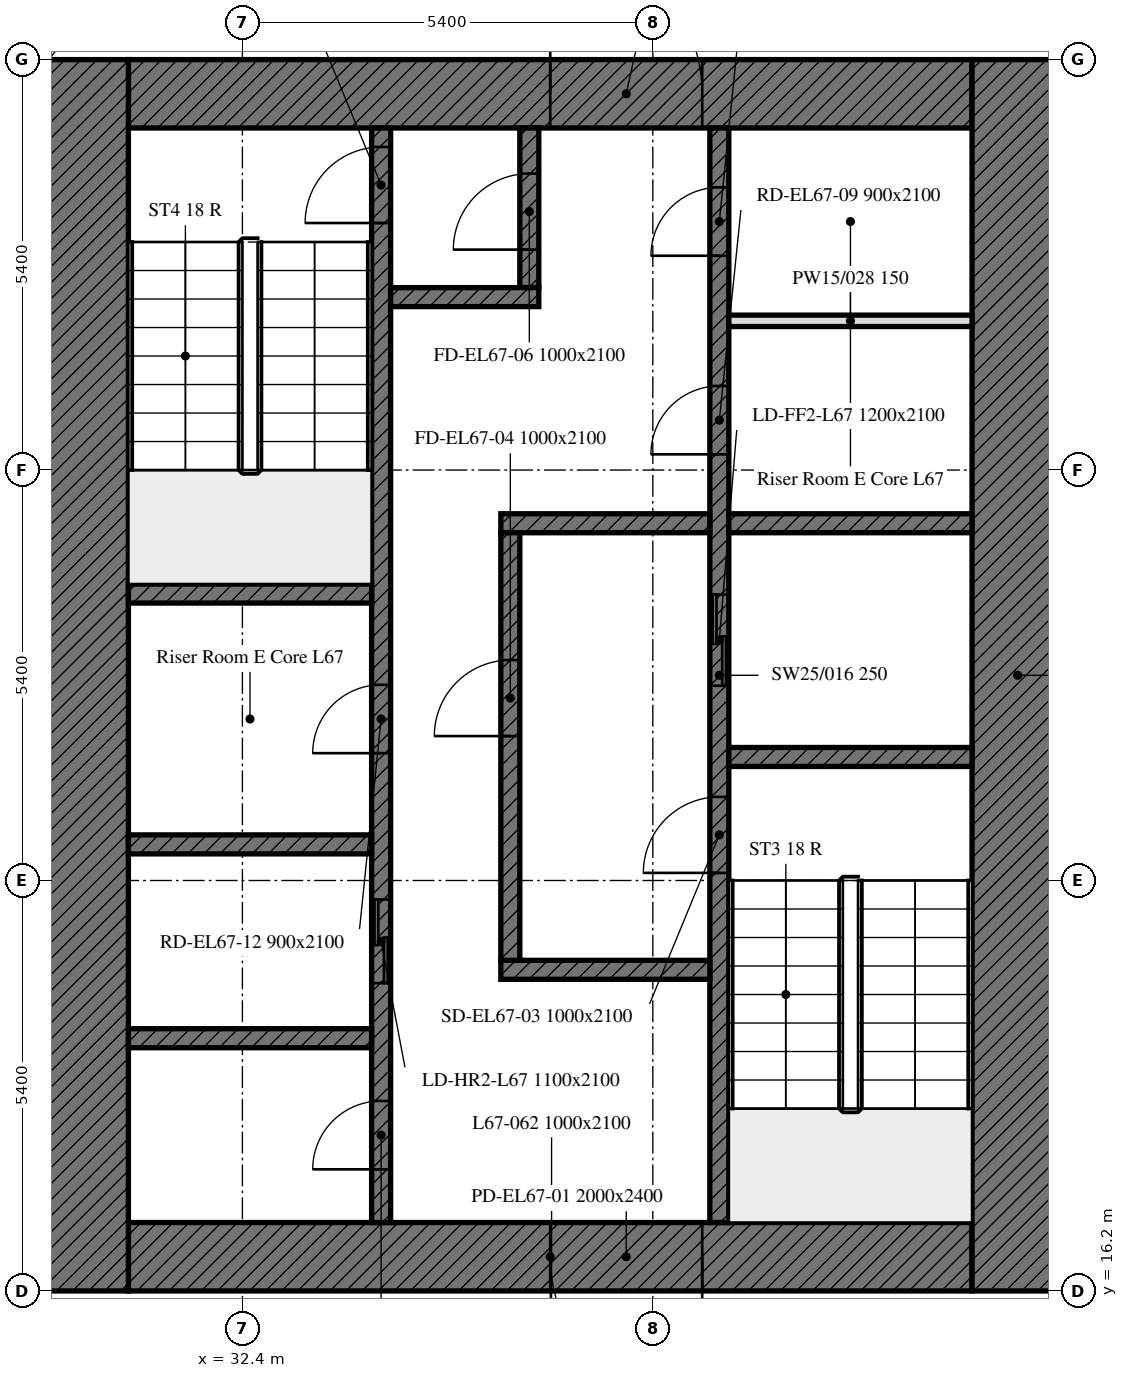
"""IFC4 building model, lengths in metres.
Left out: names, types, materials, properties, quantities, classifications, styles, units other than length and angle.
Written with IfcOpenShell. Run it as: python <this file> out.ifc"""

import sys

from ifc_helpers import new_model, si_unit, direction, frame, frame_2d, origin, place, context, subcontext, project, spatial, rectangle, extrude, element, fill, save


model = new_model("IFC4")
c1 = context("Model", 3, precision=1e-05, world=origin(), true_north=direction((0.0, 1.0)))
c2 = subcontext(c1, "Body", "Model", "MODEL_VIEW")
j1 = project(units=[si_unit("LENGTHUNIT", "METRE"), si_unit("PLANEANGLEUNIT", "RADIAN")], contexts=[c1])
p1 = place(None, origin())
s1 = spatial("IfcSite", under=j1, at=p1, CompositionType="ELEMENT")
p2 = place(p1, origin())
s2 = spatial("IfcBuilding", under=s1, at=p2, CompositionType="ELEMENT")
p3 = place(p2, frame((0.0, 0.0, 275.2)))
s3 = spatial("IfcBuildingStorey", under=s2, at=p3, CompositionType="ELEMENT", Elevation=275.2)
p4 = place(p3, frame((42.0, 16.65, 0.0), z_axis=(0.0, 0.0, 1.0), x_axis=(-1.0, 0.0, 0.0)))
e1 = element("IfcWall", 1, at=p4, inside=s3, PredefinedType="SOLIDWALL", context=c2, shape_type="SweptSolid", body=[
    extrude(rectangle(XDim=11.1, YDim=0.9, at=frame_2d((5.55, 0.0))), origin(), (0.0, 0.0, 1.0), 3.0),
])
p5 = place(p4, frame((3.55, 0.0, 0.0)))
e2 = element("IfcOpeningElement", 2, at=p5, cuts=e1, PredefinedType="OPENING", context=c2, shape_type="SweptSolid", body=[
    extrude(rectangle(XDim=2.0, YDim=2.4, at=frame_2d((1.0, 1.2))), frame((0.0, 0.45, 0.0), z_axis=(0.0, -1.0, 0.0), x_axis=(1.0, 0.0, 0.0)), (0.0, 0.0, 1.0), 0.9),
])
p6 = place(p3, frame((30.9, 31.95, 0.0), z_axis=(0.0, 0.0, 1.0), x_axis=(1.0, 0.0, 0.0)))
e3 = element("IfcWall", 3, at=p6, inside=s3, PredefinedType="SOLIDWALL", context=c2, shape_type="SweptSolid", body=[
    extrude(rectangle(XDim=11.1, YDim=0.9, at=frame_2d((5.55, 0.0))), origin(), (0.0, 0.0, 1.0), 3.0),
])
p7 = place(p6, frame((5.55, 0.0, 0.0)))
e4 = element("IfcOpeningElement", 4, at=p7, cuts=e3, PredefinedType="OPENING", context=c2, shape_type="SweptSolid", body=[
    extrude(rectangle(XDim=2.0, YDim=2.4, at=frame_2d((1.0, 1.2))), frame((0.0, 0.45, 0.0), z_axis=(0.0, -1.0, 0.0), x_axis=(1.0, 0.0, 0.0)), (0.0, 0.0, 1.0), 0.9),
])
for number, where, z_axis, x_axis in (
    (5, (42.6, 32.4, 0.0), (0.0, 0.0, 1.0), (0.0, -1.0, 0.0)),
    (6, (30.3, 16.2, 0.0), (0.0, 0.0, 1.0), (0.0, 1.0, 0.0)),
):
    element("IfcWall", number, at=place(p3, frame(where, z_axis=z_axis, x_axis=x_axis)), inside=s3, PredefinedType="SOLIDWALL", context=c2, shape_type="SweptSolid", body=[
        extrude(rectangle(XDim=16.2, YDim=1.2, at=frame_2d((8.1, 0.0))), origin(), (0.0, 0.0, 1.0), 3.0),
    ])
p8 = place(p3, frame((38.675, 17.1, 0.0), z_axis=(0.0, 0.0, 1.0), x_axis=(0.0, 1.0, 0.0)))
e7 = element("IfcWall", 7, at=p8, inside=s3, PredefinedType="SOLIDWALL", context=c2, shape_type="SweptSolid", body=[
    extrude(rectangle(XDim=14.4, YDim=0.25, at=frame_2d((7.2, 0.0))), origin(), (0.0, 0.0, 1.0), 3.0),
])
p9 = place(p8, frame((4.6, 0.0, 0.0)))
e8 = element("IfcOpeningElement", 8, at=p9, cuts=e7, PredefinedType="OPENING", context=c2, shape_type="SweptSolid", body=[
    extrude(rectangle(XDim=1.0, YDim=2.1, at=frame_2d((0.5, 1.05))), frame((0.0, 0.125, 0.0), z_axis=(0.0, -1.0, 0.0), x_axis=(1.0, 0.0, 0.0)), (0.0, 0.0, 1.0), 0.25),
])
p10 = place(p8, frame((7.062, 0.0, 0.0)))
e9 = element("IfcOpeningElement", 9, at=p10, cuts=e7, PredefinedType="OPENING", context=c2, shape_type="SweptSolid", body=[
    extrude(rectangle(XDim=1.2, YDim=2.1, at=frame_2d((0.6, 1.05))), frame((0.0, 0.125, 0.0), z_axis=(0.0, -1.0, 0.0), x_axis=(1.0, 0.0, 0.0)), (0.0, 0.0, 1.0), 0.25),
])
p11 = place(p8, frame((10.106, 0.0, 0.0)))
e10 = element("IfcOpeningElement", 10, at=p11, cuts=e7, PredefinedType="OPENING", context=c2, shape_type="SweptSolid", body=[
    extrude(rectangle(XDim=0.9, YDim=2.1, at=frame_2d((0.45, 1.05))), frame((0.0, 0.125, 0.0), z_axis=(0.0, -1.0, 0.0), x_axis=(1.0, 0.0, 0.0)), (0.0, 0.0, 1.0), 0.25),
])
p12 = place(p8, frame((12.719, 0.0, 0.0)))
e11 = element("IfcOpeningElement", 11, at=p12, cuts=e7, PredefinedType="OPENING", context=c2, shape_type="SweptSolid", body=[
    extrude(rectangle(XDim=0.9, YDim=2.1, at=frame_2d((0.45, 1.05))), frame((0.0, 0.125, 0.0), z_axis=(0.0, -1.0, 0.0), x_axis=(1.0, 0.0, 0.0)), (0.0, 0.0, 1.0), 0.25),
])
p13 = place(p3, frame((34.225, 17.1, 0.0), z_axis=(0.0, 0.0, 1.0), x_axis=(0.0, 1.0, 0.0)))
e12 = element("IfcWall", 12, at=p13, inside=s3, PredefinedType="SOLIDWALL", context=c2, shape_type="SweptSolid", body=[
    extrude(rectangle(XDim=14.4, YDim=0.25, at=frame_2d((7.2, 0.0))), origin(), (0.0, 0.0, 1.0), 3.0),
])
p14 = place(p13, frame((13.15, 0.0, 0.0)))
e13 = element("IfcOpeningElement", 13, at=p14, cuts=e12, PredefinedType="OPENING", context=c2, shape_type="SweptSolid", body=[
    extrude(rectangle(XDim=1.0, YDim=2.1, at=frame_2d((0.5, 1.05))), frame((0.0, 0.125, 0.0), z_axis=(0.0, -1.0, 0.0), x_axis=(1.0, 0.0, 0.0)), (0.0, 0.0, 1.0), 0.25),
])
p15 = place(p13, frame((3.15, 0.0, 0.0)))
e14 = element("IfcOpeningElement", 14, at=p15, cuts=e12, PredefinedType="OPENING", context=c2, shape_type="SweptSolid", body=[
    extrude(rectangle(XDim=1.1, YDim=2.1, at=frame_2d((0.55, 1.05))), frame((0.0, 0.125, 0.0), z_axis=(0.0, -1.0, 0.0), x_axis=(1.0, 0.0, 0.0)), (0.0, 0.0, 1.0), 0.25),
])
p16 = place(p13, frame((0.7, 0.0, 0.0)))
e15 = element("IfcOpeningElement", 15, at=p16, cuts=e12, PredefinedType="OPENING", context=c2, shape_type="SweptSolid", body=[
    extrude(rectangle(XDim=0.9, YDim=2.1, at=frame_2d((0.45, 1.05))), frame((0.0, 0.125, 0.0), z_axis=(0.0, -1.0, 0.0), x_axis=(1.0, 0.0, 0.0)), (0.0, 0.0, 1.0), 0.25),
])
p17 = place(p13, frame((6.175, 0.0, 0.0)))
e16 = element("IfcOpeningElement", 16, at=p17, cuts=e12, PredefinedType="OPENING", context=c2, shape_type="SweptSolid", body=[
    extrude(rectangle(XDim=0.9, YDim=2.1, at=frame_2d((0.45, 1.05))), frame((0.0, 0.125, 0.0), z_axis=(0.0, -1.0, 0.0), x_axis=(1.0, 0.0, 0.0)), (0.0, 0.0, 1.0), 0.25),
])
p18 = place(p3, frame((38.8, 23.225, 0.0), z_axis=(0.0, 0.0, 1.0), x_axis=(1.0, 0.0, 0.0)))
e17 = element("IfcWall", 17, at=p18, inside=s3, PredefinedType="SOLIDWALL", context=c2, shape_type="SweptSolid", body=[
    extrude(rectangle(XDim=3.2, YDim=0.25, at=frame_2d((1.6, 0.0))), origin(), (0.0, 0.0, 1.0), 3.0),
])
for number, where, z_axis, x_axis in (
    (18, (30.9, 25.375, 0.0), (0.0, 0.0, 1.0), (1.0, 0.0, 0.0)),
    (19, (30.9, 22.075, 0.0), (0.0, 0.0, 1.0), (1.0, 0.0, 0.0)),
):
    element("IfcWall", number, at=place(p3, frame(where, z_axis=z_axis, x_axis=x_axis)), inside=s3, PredefinedType="SOLIDWALL", context=c2, shape_type="SweptSolid", body=[
        extrude(rectangle(XDim=3.2, YDim=0.25, at=frame_2d((1.6, 0.0))), origin(), (0.0, 0.0, 1.0), 3.0),
    ])
p19 = place(p3, frame((38.8, 26.3, 0.0), z_axis=(0.0, 0.0, 1.0), x_axis=(1.0, 0.0, 0.0)))
e20 = element("IfcWall", 20, at=p19, inside=s3, PredefinedType="SOLIDWALL", context=c2, shape_type="SweptSolid", body=[
    extrude(rectangle(XDim=3.2, YDim=0.25, at=frame_2d((1.6, 0.0))), origin(), (0.0, 0.0, 1.0), 3.0),
])
for number, where, z_axis, x_axis in (
    (21, (35.8, 26.3, 0.0), (0.0, 0.0, 1.0), (1.0, 0.0, 0.0)),
    (22, (35.8, 20.425, 0.0), (0.0, 0.0, 1.0), (1.0, 0.0, 0.0)),
):
    element("IfcWall", number, at=place(p3, frame(where, z_axis=z_axis, x_axis=x_axis)), inside=s3, PredefinedType="SOLIDWALL", context=c2, shape_type="SweptSolid", body=[
        extrude(rectangle(XDim=2.75, YDim=0.25, at=frame_2d((1.375, 0.0))), origin(), (0.0, 0.0, 1.0), 3.0),
    ])
p20 = place(p3, frame((36.175, 29.4, 0.0), z_axis=(0.0, 0.0, 1.0), x_axis=(0.0, 1.0, 0.0)))
e23 = element("IfcWall", 23, at=p20, inside=s3, PredefinedType="SOLIDWALL", context=c2, shape_type="SweptSolid", body=[
    extrude(rectangle(XDim=2.1, YDim=0.25, at=frame_2d((1.05, 0.0))), origin(), (0.0, 0.0, 1.0), 3.0),
])
p21 = place(p20, frame((0.5, 0.0, 0.0)))
e24 = element("IfcOpeningElement", 24, at=p21, cuts=e23, PredefinedType="OPENING", context=c2, shape_type="SweptSolid", body=[
    extrude(rectangle(XDim=1.0, YDim=2.1, at=frame_2d((0.5, 1.05))), frame((0.0, 0.125, 0.0), z_axis=(0.0, -1.0, 0.0), x_axis=(1.0, 0.0, 0.0)), (0.0, 0.0, 1.0), 0.25),
])
p22 = place(p3, frame((34.35, 29.275, 0.0), z_axis=(0.0, 0.0, 1.0), x_axis=(1.0, 0.0, 0.0)))
e25 = element("IfcWall", 25, at=p22, inside=s3, PredefinedType="SOLIDWALL", context=c2, shape_type="SweptSolid", body=[
    extrude(rectangle(XDim=1.95, YDim=0.25, at=frame_2d((0.975, 0.0))), origin(), (0.0, 0.0, 1.0), 3.0),
])
p23 = place(p3, frame((35.925, 20.55, 0.0), z_axis=(0.0, 0.0, 1.0), x_axis=(0.0, 1.0, 0.0)))
e26 = element("IfcWall", 26, at=p23, inside=s3, PredefinedType="SOLIDWALL", context=c2, shape_type="SweptSolid", body=[
    extrude(rectangle(XDim=5.625, YDim=0.25, at=frame_2d((2.812, 0.0))), origin(), (0.0, 0.0, 1.0), 3.0),
])
p24 = place(p23, frame((2.95, 0.0, 0.0)))
e27 = element("IfcOpeningElement", 27, at=p24, cuts=e26, PredefinedType="OPENING", context=c2, shape_type="SweptSolid", body=[
    extrude(rectangle(XDim=1.0, YDim=2.1, at=frame_2d((0.5, 1.05))), frame((0.0, 0.125, 0.0), z_axis=(0.0, -1.0, 0.0), x_axis=(1.0, 0.0, 0.0)), (0.0, 0.0, 1.0), 0.25),
])
p25 = place(p3, frame((30.9, 19.525, 0.0), z_axis=(0.0, 0.0, 1.0), x_axis=(1.0, 0.0, 0.0)))
e28 = element("IfcWall", 28, at=p25, inside=s3, PredefinedType="SOLIDWALL", context=c2, shape_type="SweptSolid", body=[
    extrude(rectangle(XDim=3.2, YDim=0.25, at=frame_2d((1.6, 0.0))), origin(), (0.0, 0.0, 1.0), 3.0),
])
p26 = place(p3, frame((38.8, 28.963, 0.0), z_axis=(0.0, 0.0, 1.0), x_axis=(1.0, 0.0, 0.0)))
e29 = element("IfcWall", 29, at=p26, inside=s3, PredefinedType="PARTITIONING", context=c2, shape_type="SweptSolid", body=[
    extrude(rectangle(XDim=3.2, YDim=0.15, at=frame_2d((1.6, 0.0))), origin(), (0.0, 0.0, 1.0), 3.0),
])
p27 = place(p5, origin())
e30 = element("IfcDoor", 30, at=p27, inside=s3, OperationType="DOUBLE_DOOR_SINGLE_SWING", PredefinedType="DOOR", context=c2, shape_type="SweptSolid", body=[
    extrude(rectangle(XDim=2.0, YDim=2.4, at=frame_2d((1.0, 1.2))), frame((0.0, 0.025, 0.0), z_axis=(0.0, -1.0, 0.0), x_axis=(1.0, 0.0, 0.0)), (0.0, 0.0, 1.0), 0.05),
])
fill(e2, e30)
p28 = place(p7, origin())
e31 = element("IfcDoor", 31, at=p28, inside=s3, OperationType="DOUBLE_DOOR_SINGLE_SWING", PredefinedType="DOOR", context=c2, shape_type="SweptSolid", body=[
    extrude(rectangle(XDim=2.0, YDim=2.4, at=frame_2d((1.0, 1.2))), frame((0.0, 0.025, 0.0), z_axis=(0.0, -1.0, 0.0), x_axis=(1.0, 0.0, 0.0)), (0.0, 0.0, 1.0), 0.05),
])
fill(e4, e31)
p29 = place(p9, origin())
e32 = element("IfcDoor", 32, at=p29, inside=s3, OperationType="SINGLE_SWING_LEFT", PredefinedType="DOOR", context=c2, shape_type="SweptSolid", body=[
    extrude(rectangle(XDim=1.0, YDim=2.1, at=frame_2d((0.5, 1.05))), frame((0.0, 0.025, 0.0), z_axis=(0.0, -1.0, 0.0), x_axis=(1.0, 0.0, 0.0)), (0.0, 0.0, 1.0), 0.05),
])
fill(e8, e32)
p30 = place(p24, origin())
e33 = element("IfcDoor", 33, at=p30, inside=s3, OperationType="SINGLE_SWING_LEFT", PredefinedType="DOOR", context=c2, shape_type="SweptSolid", body=[
    extrude(rectangle(XDim=1.0, YDim=2.1, at=frame_2d((0.5, 1.05))), frame((0.0, 0.025, 0.0), z_axis=(0.0, -1.0, 0.0), x_axis=(1.0, 0.0, 0.0)), (0.0, 0.0, 1.0), 0.05),
])
fill(e27, e33)
p31 = place(p14, origin())
e34 = element("IfcDoor", 34, at=p31, inside=s3, OperationType="SINGLE_SWING_LEFT", PredefinedType="DOOR", context=c2, shape_type="SweptSolid", body=[
    extrude(rectangle(XDim=1.0, YDim=2.1, at=frame_2d((0.5, 1.05))), frame((0.0, 0.025, 0.0), z_axis=(0.0, -1.0, 0.0), x_axis=(1.0, 0.0, 0.0)), (0.0, 0.0, 1.0), 0.05),
])
fill(e13, e34)
p32 = place(p21, origin())
e35 = element("IfcDoor", 35, at=p32, inside=s3, OperationType="SINGLE_SWING_LEFT", PredefinedType="DOOR", context=c2, shape_type="SweptSolid", body=[
    extrude(rectangle(XDim=1.0, YDim=2.1, at=frame_2d((0.5, 1.05))), frame((0.0, 0.025, 0.0), z_axis=(0.0, -1.0, 0.0), x_axis=(1.0, 0.0, 0.0)), (0.0, 0.0, 1.0), 0.05),
])
fill(e24, e35)
p33 = place(p10, origin())
e36 = element("IfcDoor", 36, at=p33, inside=s3, OperationType="DOUBLE_DOOR_SLIDING", PredefinedType="DOOR", context=c2, shape_type="SweptSolid", body=[
    extrude(rectangle(XDim=1.2, YDim=2.1, at=frame_2d((0.6, 1.05))), frame((0.0, 0.025, 0.0), z_axis=(0.0, -1.0, 0.0), x_axis=(1.0, 0.0, 0.0)), (0.0, 0.0, 1.0), 0.05),
])
fill(e9, e36)
p34 = place(p15, origin())
e37 = element("IfcDoor", 37, at=p34, inside=s3, OperationType="DOUBLE_DOOR_SLIDING", PredefinedType="DOOR", context=c2, shape_type="SweptSolid", body=[
    extrude(rectangle(XDim=1.1, YDim=2.1, at=frame_2d((0.55, 1.05))), frame((0.0, 0.025, 0.0), z_axis=(0.0, -1.0, 0.0), x_axis=(1.0, 0.0, 0.0)), (0.0, 0.0, 1.0), 0.05),
])
fill(e14, e37)
p35 = place(p11, origin())
e38 = element("IfcDoor", 38, at=p35, inside=s3, OperationType="SINGLE_SWING_LEFT", PredefinedType="DOOR", context=c2, shape_type="SweptSolid", body=[
    extrude(rectangle(XDim=0.9, YDim=2.1, at=frame_2d((0.45, 1.05))), frame((0.0, 0.025, 0.0), z_axis=(0.0, -1.0, 0.0), x_axis=(1.0, 0.0, 0.0)), (0.0, 0.0, 1.0), 0.05),
])
fill(e10, e38)
p36 = place(p12, origin())
e39 = element("IfcDoor", 39, at=p36, inside=s3, OperationType="SINGLE_SWING_LEFT", PredefinedType="DOOR", context=c2, shape_type="SweptSolid", body=[
    extrude(rectangle(XDim=0.9, YDim=2.1, at=frame_2d((0.45, 1.05))), frame((0.0, 0.025, 0.0), z_axis=(0.0, -1.0, 0.0), x_axis=(1.0, 0.0, 0.0)), (0.0, 0.0, 1.0), 0.05),
])
fill(e11, e39)
p37 = place(p16, origin())
e40 = element("IfcDoor", 40, at=p37, inside=s3, OperationType="SINGLE_SWING_LEFT", PredefinedType="DOOR", context=c2, shape_type="SweptSolid", body=[
    extrude(rectangle(XDim=0.9, YDim=2.1, at=frame_2d((0.45, 1.05))), frame((0.0, 0.025, 0.0), z_axis=(0.0, -1.0, 0.0), x_axis=(1.0, 0.0, 0.0)), (0.0, 0.0, 1.0), 0.05),
])
fill(e15, e40)
p38 = place(p17, origin())
e41 = element("IfcDoor", 41, at=p38, inside=s3, OperationType="SINGLE_SWING_LEFT", PredefinedType="DOOR", context=c2, shape_type="SweptSolid", body=[
    extrude(rectangle(XDim=0.9, YDim=2.1, at=frame_2d((0.45, 1.05))), frame((0.0, 0.025, 0.0), z_axis=(0.0, -1.0, 0.0), x_axis=(1.0, 0.0, 0.0)), (0.0, 0.0, 1.0), 0.05),
])
fill(e16, e41)
save(model, sys.argv[1])
